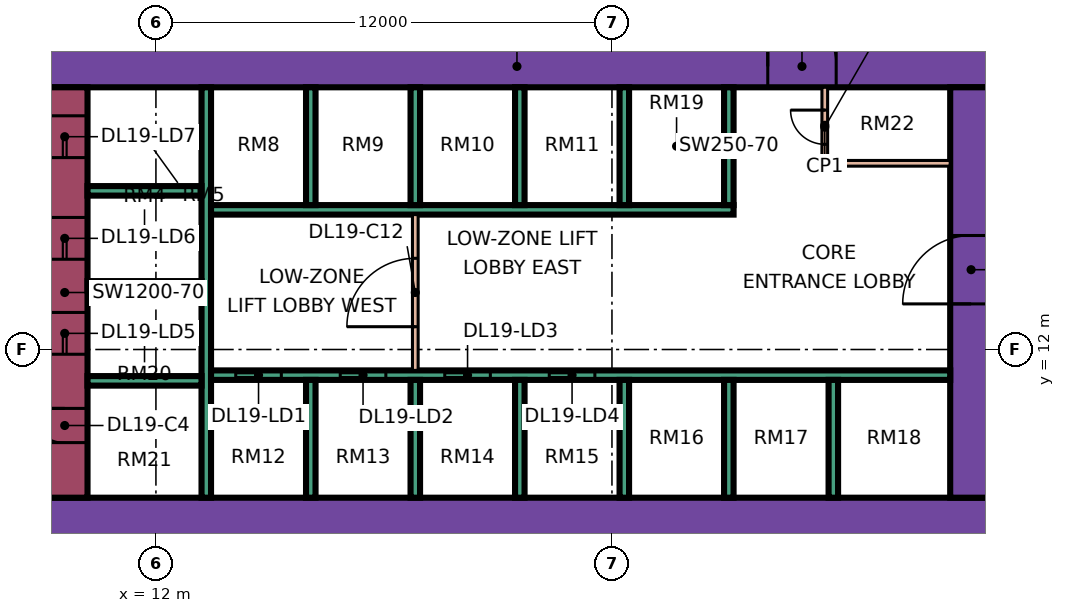
"""IFC4 building model, lengths in metres.
Left out: names, types, materials, properties, quantities, classifications, styles, units other than length and angle.
Written with IfcOpenShell. Run it as: python <this file> out.ifc"""

import sys

from ifc_helpers import new_model, si_unit, direction, frame, frame_2d, origin, place, context, subcontext, project, spatial, rectangle, extrude, element, fill, save


model = new_model("IFC4")
c1 = context("Model", 3, precision=1e-05, world=origin(), true_north=direction((0.0, 1.0)))
c2 = subcontext(c1, "Body", "Model", "MODEL_VIEW")
j1 = project(units=[si_unit("LENGTHUNIT", "METRE"), si_unit("PLANEANGLEUNIT", "RADIAN")], contexts=[c1])
p1 = place(None, origin())
s1 = spatial("IfcSite", under=j1, at=p1, CompositionType="ELEMENT")
p2 = place(p1, origin())
s2 = spatial("IfcBuilding", under=s1, at=p2, CompositionType="ELEMENT")
p3 = place(p2, frame((0.0, 0.0, 86.4)))
s3 = spatial("IfcBuildingStorey", under=s2, at=p3, CompositionType="ELEMENT", Elevation=86.4)
p4 = place(p3, frame((9.0, 7.55, 0.0), z_axis=(0.0, 0.0, 1.0), x_axis=(1.0, 0.0, 0.0)))
e1 = element("IfcWall", 1, at=p4, inside=s3, PredefinedType="SHEAR", context=c2, shape_type="SweptSolid", body=[
    extrude(rectangle(XDim=25.0, YDim=1.1, at=frame_2d((12.5, 0.0))), origin(), (0.0, 0.0, 1.0), 5.5),
])
p5 = place(p3, frame((9.0, 19.45, 0.0), z_axis=(0.0, 0.0, 1.0), x_axis=(1.0, 0.0, 0.0)))
e2 = element("IfcWall", 2, at=p5, inside=s3, PredefinedType="SHEAR", context=c2, shape_type="SweptSolid", body=[
    extrude(rectangle(XDim=25.0, YDim=1.1, at=frame_2d((12.5, 0.0))), origin(), (0.0, 0.0, 1.0), 5.5),
])
p6 = place(p5, frame((19.1, 0.0, 0.0)))
e3 = element("IfcOpeningElement", 3, at=p6, cuts=e2, PredefinedType="OPENING", context=c2, shape_type="SweptSolid", body=[
    extrude(rectangle(XDim=1.8, YDim=2.4, at=frame_2d((0.9, 1.2))), frame((0.0, 0.56, 0.0), z_axis=(0.0, -1.0, 0.0), x_axis=(1.0, 0.0, 0.0)), (0.0, 0.0, 1.0), 1.12),
])
p7 = place(p3, frame((9.6, 8.1, 0.0), z_axis=(0.0, 0.0, 1.0), x_axis=(0.0, 1.0, 0.0)))
e4 = element("IfcWall", 4, at=p7, inside=s3, PredefinedType="SHEAR", context=c2, shape_type="SweptSolid", body=[
    extrude(rectangle(XDim=10.8, YDim=1.2, at=frame_2d((5.4, 0.0))), origin(), (0.0, 0.0, 1.0), 5.5),
])
p8 = place(p7, frame((3.775, 0.0, 0.0)))
e5 = element("IfcOpeningElement", 5, at=p8, cuts=e4, PredefinedType="OPENING", context=c2, shape_type="SweptSolid", body=[
    extrude(rectangle(XDim=1.1, YDim=2.2, at=frame_2d((0.55, 1.1))), frame((0.0, 0.61, 0.0), z_axis=(0.0, -1.0, 0.0), x_axis=(1.0, 0.0, 0.0)), (0.0, 0.0, 1.0), 1.22),
])
p9 = place(p7, frame((6.275, 0.0, 0.0)))
e6 = element("IfcOpeningElement", 6, at=p9, cuts=e4, PredefinedType="OPENING", context=c2, shape_type="SweptSolid", body=[
    extrude(rectangle(XDim=1.1, YDim=2.2, at=frame_2d((0.55, 1.1))), frame((0.0, 0.61, 0.0), z_axis=(0.0, -1.0, 0.0), x_axis=(1.0, 0.0, 0.0)), (0.0, 0.0, 1.0), 1.22),
])
p10 = place(p7, frame((8.95, 0.0, 0.0)))
e7 = element("IfcOpeningElement", 7, at=p10, cuts=e4, PredefinedType="OPENING", context=c2, shape_type="SweptSolid", body=[
    extrude(rectangle(XDim=1.1, YDim=2.2, at=frame_2d((0.55, 1.1))), frame((0.0, 0.61, 0.0), z_axis=(0.0, -1.0, 0.0), x_axis=(1.0, 0.0, 0.0)), (0.0, 0.0, 1.0), 1.22),
])
p11 = place(p7, frame((1.45, 0.0, 0.0)))
e8 = element("IfcOpeningElement", 8, at=p11, cuts=e4, PredefinedType="OPENING", context=c2, shape_type="SweptSolid", body=[
    extrude(rectangle(XDim=0.9, YDim=2.1, at=frame_2d((0.45, 1.05))), frame((0.0, 0.61, 0.0), z_axis=(0.0, -1.0, 0.0), x_axis=(1.0, 0.0, 0.0)), (0.0, 0.0, 1.0), 1.22),
])
p12 = place(p3, frame((33.45, 8.1, 0.0), z_axis=(0.0, 0.0, 1.0), x_axis=(0.0, 1.0, 0.0)))
e9 = element("IfcWall", 9, at=p12, inside=s3, PredefinedType="SHEAR", context=c2, shape_type="SweptSolid", body=[
    extrude(rectangle(XDim=10.8, YDim=1.1, at=frame_2d((5.4, 0.0))), origin(), (0.0, 0.0, 1.0), 5.5),
])
p13 = place(p12, frame((5.1, 0.0, 0.0)))
e10 = element("IfcOpeningElement", 10, at=p13, cuts=e9, PredefinedType="OPENING", context=c2, shape_type="SweptSolid", body=[
    extrude(rectangle(XDim=1.8, YDim=2.4, at=frame_2d((0.9, 1.2))), frame((0.0, 0.56, 0.0), z_axis=(0.0, -1.0, 0.0), x_axis=(1.0, 0.0, 0.0)), (0.0, 0.0, 1.0), 1.12),
])
p14 = place(p3, frame((13.325, 8.1, 0.0), z_axis=(0.0, 0.0, 1.0), x_axis=(0.0, 1.0, 0.0)))
e11 = element("IfcWall", 11, at=p14, inside=s3, PredefinedType="SHEAR", context=c2, shape_type="SweptSolid", body=[
    extrude(rectangle(XDim=10.8, YDim=0.25, at=frame_2d((5.4, 0.0))), origin(), (0.0, 0.0, 1.0), 5.5),
])
p15 = place(p3, frame((13.45, 11.325, 0.0), z_axis=(0.0, 0.0, 1.0), x_axis=(1.0, 0.0, 0.0)))
e12 = element("IfcWall", 12, at=p15, inside=s3, PredefinedType="SHEAR", context=c2, shape_type="SweptSolid", body=[
    extrude(rectangle(XDim=19.45, YDim=0.25, at=frame_2d((9.725, 0.0))), origin(), (0.0, 0.0, 1.0), 5.5),
])
p16 = place(p15, frame((0.65, 0.0, 0.0)))
e13 = element("IfcOpeningElement", 13, at=p16, cuts=e12, PredefinedType="OPENING", context=c2, shape_type="SweptSolid", body=[
    extrude(rectangle(XDim=1.2, YDim=2.2, at=frame_2d((0.6, 1.1))), frame((0.0, 0.135, 0.0), z_axis=(0.0, -1.0, 0.0), x_axis=(1.0, 0.0, 0.0)), (0.0, 0.0, 1.0), 0.27),
])
p17 = place(p15, frame((3.4, 0.0, 0.0)))
e14 = element("IfcOpeningElement", 14, at=p17, cuts=e12, PredefinedType="OPENING", context=c2, shape_type="SweptSolid", body=[
    extrude(rectangle(XDim=1.2, YDim=2.2, at=frame_2d((0.6, 1.1))), frame((0.0, 0.135, 0.0), z_axis=(0.0, -1.0, 0.0), x_axis=(1.0, 0.0, 0.0)), (0.0, 0.0, 1.0), 0.27),
])
p18 = place(p15, frame((6.15, 0.0, 0.0)))
e15 = element("IfcOpeningElement", 15, at=p18, cuts=e12, PredefinedType="OPENING", context=c2, shape_type="SweptSolid", body=[
    extrude(rectangle(XDim=1.2, YDim=2.2, at=frame_2d((0.6, 1.1))), frame((0.0, 0.135, 0.0), z_axis=(0.0, -1.0, 0.0), x_axis=(1.0, 0.0, 0.0)), (0.0, 0.0, 1.0), 0.27),
])
p19 = place(p15, frame((8.9, 0.0, 0.0)))
e16 = element("IfcOpeningElement", 16, at=p19, cuts=e12, PredefinedType="OPENING", context=c2, shape_type="SweptSolid", body=[
    extrude(rectangle(XDim=1.2, YDim=2.2, at=frame_2d((0.6, 1.1))), frame((0.0, 0.135, 0.0), z_axis=(0.0, -1.0, 0.0), x_axis=(1.0, 0.0, 0.0)), (0.0, 0.0, 1.0), 0.27),
])
p20 = place(p3, frame((13.45, 15.675, 0.0), z_axis=(0.0, 0.0, 1.0), x_axis=(1.0, 0.0, 0.0)))
e17 = element("IfcWall", 17, at=p20, inside=s3, PredefinedType="SHEAR", context=c2, shape_type="SweptSolid", body=[
    extrude(rectangle(XDim=13.75, YDim=0.25, at=frame_2d((6.875, 0.0))), origin(), (0.0, 0.0, 1.0), 5.5),
])
for number, where, z_axis, x_axis in (
    (18, (10.2, 11.175, 0.0), (0.0, 0.0, 1.0), (1.0, 0.0, 0.0)),
    (19, (10.2, 13.675, 0.0), (0.0, 0.0, 1.0), (1.0, 0.0, 0.0)),
    (20, (10.2, 16.175, 0.0), (0.0, 0.0, 1.0), (1.0, 0.0, 0.0)),
):
    element("IfcWall", number, at=place(p3, frame(where, z_axis=z_axis, x_axis=x_axis)), inside=s3, PredefinedType="SHEAR", context=c2, shape_type="SweptSolid", body=[
        extrude(rectangle(XDim=3.0, YDim=0.25, at=frame_2d((1.5, 0.0))), origin(), (0.0, 0.0, 1.0), 5.5),
    ])
for number, where, z_axis, x_axis in (
    (21, (16.075, 8.1, 0.0), (0.0, 0.0, 1.0), (0.0, 1.0, 0.0)),
    (22, (18.825, 8.1, 0.0), (0.0, 0.0, 1.0), (0.0, 1.0, 0.0)),
    (23, (21.575, 8.1, 0.0), (0.0, 0.0, 1.0), (0.0, 1.0, 0.0)),
    (24, (24.325, 8.1, 0.0), (0.0, 0.0, 1.0), (0.0, 1.0, 0.0)),
    (25, (27.075, 8.1, 0.0), (0.0, 0.0, 1.0), (0.0, 1.0, 0.0)),
    (26, (29.825, 8.1, 0.0), (0.0, 0.0, 1.0), (0.0, 1.0, 0.0)),
    (27, (16.075, 15.8, 0.0), (0.0, 0.0, 1.0), (0.0, 1.0, 0.0)),
    (28, (18.825, 15.8, 0.0), (0.0, 0.0, 1.0), (0.0, 1.0, 0.0)),
    (29, (21.575, 15.8, 0.0), (0.0, 0.0, 1.0), (0.0, 1.0, 0.0)),
    (30, (24.325, 15.8, 0.0), (0.0, 0.0, 1.0), (0.0, 1.0, 0.0)),
    (31, (27.075, 15.8, 0.0), (0.0, 0.0, 1.0), (0.0, 1.0, 0.0)),
):
    element("IfcWall", number, at=place(p3, frame(where, z_axis=z_axis, x_axis=x_axis)), inside=s3, PredefinedType="SHEAR", context=c2, shape_type="SweptSolid", body=[
        extrude(rectangle(XDim=3.1, YDim=0.25, at=frame_2d((1.55, 0.0))), origin(), (0.0, 0.0, 1.0), 5.5),
    ])
p21 = place(p3, frame((-1.447, 12.553, 0.0), z_axis=(0.0, 0.0, 1.0), x_axis=(0.707106781187, -0.707106781187, 0.0)))
e32 = element("IfcWall", 32, at=p21, inside=s3, PredefinedType="SOLIDWALL", context=c2, shape_type="SweptSolid", body=[
    extrude(rectangle(XDim=19.799, YDim=0.15, at=frame_2d((9.899, 0.0))), origin(), (0.0, 0.0, 1.0), 5.1),
])
p22 = place(p21, frame((11.453, 0.0, 0.45)))
e33 = element("IfcOpeningElement", 33, at=p22, cuts=e32, PredefinedType="OPENING", context=c2, shape_type="SweptSolid", body=[
    extrude(rectangle(XDim=3.0, YDim=3.6, at=frame_2d((1.5, 1.8))), frame((0.0, 0.085, 0.0), z_axis=(0.0, -1.0, 0.0), x_axis=(1.0, 0.0, 0.0)), (0.0, 0.0, 1.0), 0.17),
])
p23 = place(p3, frame((18.825, 11.45, 0.0), z_axis=(0.0, 0.0, 1.0), x_axis=(0.0, 1.0, 0.0)))
e34 = element("IfcWall", 34, at=p23, inside=s3, PredefinedType="PARTITIONING", context=c2, shape_type="SweptSolid", body=[
    extrude(rectangle(XDim=4.1, YDim=0.15, at=frame_2d((2.05, 0.0))), origin(), (0.0, 0.0, 1.0), 5.1),
])
p24 = place(p23, frame((1.15, 0.0, 0.0)))
e35 = element("IfcOpeningElement", 35, at=p24, cuts=e34, PredefinedType="OPENING", context=c2, shape_type="SweptSolid", body=[
    extrude(rectangle(XDim=1.8, YDim=2.4, at=frame_2d((0.9, 1.2))), frame((0.0, 0.085, 0.0), z_axis=(0.0, -1.0, 0.0), x_axis=(1.0, 0.0, 0.0)), (0.0, 0.0, 1.0), 0.17),
])
p25 = place(p3, frame((29.6, 16.9, 0.0), z_axis=(0.0, 0.0, 1.0), x_axis=(0.0, 1.0, 0.0)))
e36 = element("IfcWall", 36, at=p25, inside=s3, PredefinedType="PARTITIONING", context=c2, shape_type="SweptSolid", body=[
    extrude(rectangle(XDim=2.0, YDim=0.15, at=frame_2d((1.0, 0.0))), origin(), (0.0, 0.0, 1.0), 5.1),
])
p26 = place(p25, frame((0.5, 0.0, 0.0)))
e37 = element("IfcOpeningElement", 37, at=p26, cuts=e36, PredefinedType="OPENING", context=c2, shape_type="SweptSolid", body=[
    extrude(rectangle(XDim=0.9, YDim=2.1, at=frame_2d((0.45, 1.05))), frame((0.0, 0.085, 0.0), z_axis=(0.0, -1.0, 0.0), x_axis=(1.0, 0.0, 0.0)), (0.0, 0.0, 1.0), 0.17),
])
p27 = place(p3, frame((29.6, 16.9, 0.0), z_axis=(0.0, 0.0, 1.0), x_axis=(1.0, 0.0, 0.0)))
e38 = element("IfcWall", 38, at=p27, inside=s3, PredefinedType="PARTITIONING", context=c2, shape_type="SweptSolid", body=[
    extrude(rectangle(XDim=3.3, YDim=0.15, at=frame_2d((1.65, 0.0))), origin(), (0.0, 0.0, 1.0), 5.1),
])
p28 = place(p16, origin())
e39 = element("IfcDoor", 39, at=p28, inside=s3, OperationType="DOUBLE_DOOR_SLIDING", PredefinedType="DOOR", context=c2, shape_type="SweptSolid", body=[
    extrude(rectangle(XDim=1.2, YDim=2.2, at=frame_2d((0.6, 1.1))), frame((0.0, 0.025, 0.0), z_axis=(0.0, -1.0, 0.0), x_axis=(1.0, 0.0, 0.0)), (0.0, 0.0, 1.0), 0.05),
])
fill(e13, e39)
p29 = place(p17, origin())
e40 = element("IfcDoor", 40, at=p29, inside=s3, OperationType="DOUBLE_DOOR_SLIDING", PredefinedType="DOOR", context=c2, shape_type="SweptSolid", body=[
    extrude(rectangle(XDim=1.2, YDim=2.2, at=frame_2d((0.6, 1.1))), frame((0.0, 0.025, 0.0), z_axis=(0.0, -1.0, 0.0), x_axis=(1.0, 0.0, 0.0)), (0.0, 0.0, 1.0), 0.05),
])
fill(e14, e40)
p30 = place(p18, origin())
e41 = element("IfcDoor", 41, at=p30, inside=s3, OperationType="DOUBLE_DOOR_SLIDING", PredefinedType="DOOR", context=c2, shape_type="SweptSolid", body=[
    extrude(rectangle(XDim=1.2, YDim=2.2, at=frame_2d((0.6, 1.1))), frame((0.0, 0.025, 0.0), z_axis=(0.0, -1.0, 0.0), x_axis=(1.0, 0.0, 0.0)), (0.0, 0.0, 1.0), 0.05),
])
fill(e15, e41)
p31 = place(p19, origin())
e42 = element("IfcDoor", 42, at=p31, inside=s3, OperationType="DOUBLE_DOOR_SLIDING", PredefinedType="DOOR", context=c2, shape_type="SweptSolid", body=[
    extrude(rectangle(XDim=1.2, YDim=2.2, at=frame_2d((0.6, 1.1))), frame((0.0, 0.025, 0.0), z_axis=(0.0, -1.0, 0.0), x_axis=(1.0, 0.0, 0.0)), (0.0, 0.0, 1.0), 0.05),
])
fill(e16, e42)
p32 = place(p8, origin())
e43 = element("IfcDoor", 43, at=p32, inside=s3, OperationType="DOUBLE_DOOR_SLIDING", PredefinedType="DOOR", context=c2, shape_type="SweptSolid", body=[
    extrude(rectangle(XDim=1.1, YDim=2.2, at=frame_2d((0.55, 1.1))), frame((0.0, 0.025, 0.0), z_axis=(0.0, -1.0, 0.0), x_axis=(1.0, 0.0, 0.0)), (0.0, 0.0, 1.0), 0.05),
])
fill(e5, e43)
p33 = place(p9, origin())
e44 = element("IfcDoor", 44, at=p33, inside=s3, OperationType="DOUBLE_DOOR_SLIDING", PredefinedType="DOOR", context=c2, shape_type="SweptSolid", body=[
    extrude(rectangle(XDim=1.1, YDim=2.2, at=frame_2d((0.55, 1.1))), frame((0.0, 0.025, 0.0), z_axis=(0.0, -1.0, 0.0), x_axis=(1.0, 0.0, 0.0)), (0.0, 0.0, 1.0), 0.05),
])
fill(e6, e44)
p34 = place(p10, origin())
e45 = element("IfcDoor", 45, at=p34, inside=s3, OperationType="DOUBLE_DOOR_SLIDING", PredefinedType="DOOR", context=c2, shape_type="SweptSolid", body=[
    extrude(rectangle(XDim=1.1, YDim=2.2, at=frame_2d((0.55, 1.1))), frame((0.0, 0.025, 0.0), z_axis=(0.0, -1.0, 0.0), x_axis=(1.0, 0.0, 0.0)), (0.0, 0.0, 1.0), 0.05),
])
fill(e7, e45)
p35 = place(p13, origin())
e46 = element("IfcDoor", 46, at=p35, inside=s3, OperationType="DOUBLE_DOOR_SINGLE_SWING", PredefinedType="DOOR", context=c2, shape_type="SweptSolid", body=[
    extrude(rectangle(XDim=1.8, YDim=2.4, at=frame_2d((0.9, 1.2))), frame((0.0, 0.025, 0.0), z_axis=(0.0, -1.0, 0.0), x_axis=(1.0, 0.0, 0.0)), (0.0, 0.0, 1.0), 0.05),
])
fill(e10, e46)
p36 = place(p6, origin())
e47 = element("IfcDoor", 47, at=p36, inside=s3, OperationType="DOUBLE_DOOR_SINGLE_SWING", PredefinedType="DOOR", context=c2, shape_type="SweptSolid", body=[
    extrude(rectangle(XDim=1.8, YDim=2.4, at=frame_2d((0.9, 1.2))), frame((0.0, 0.025, 0.0), z_axis=(0.0, -1.0, 0.0), x_axis=(1.0, 0.0, 0.0)), (0.0, 0.0, 1.0), 0.05),
])
fill(e3, e47)
p37 = place(p11, frame((0.9, 0.0, 0.0), z_axis=(0.0, 0.0, 1.0), x_axis=(-1.0, 0.0, 0.0)))
e48 = element("IfcDoor", 48, at=p37, inside=s3, OperationType="SINGLE_SWING_RIGHT", PredefinedType="DOOR", context=c2, shape_type="SweptSolid", body=[
    extrude(rectangle(XDim=0.9, YDim=2.1, at=frame_2d((0.45, 1.05))), frame((0.0, 0.025, 0.0), z_axis=(0.0, -1.0, 0.0), x_axis=(1.0, 0.0, 0.0)), (0.0, 0.0, 1.0), 0.05),
])
fill(e8, e48)
p38 = place(p24, origin())
e49 = element("IfcDoor", 49, at=p38, inside=s3, OperationType="DOUBLE_DOOR_SINGLE_SWING", PredefinedType="DOOR", context=c2, shape_type="SweptSolid", body=[
    extrude(rectangle(XDim=1.8, YDim=2.4, at=frame_2d((0.9, 1.2))), frame((0.0, 0.025, 0.0), z_axis=(0.0, -1.0, 0.0), x_axis=(1.0, 0.0, 0.0)), (0.0, 0.0, 1.0), 0.05),
])
fill(e35, e49)
p39 = place(p26, frame((0.9, 0.0, 0.0), z_axis=(0.0, 0.0, 1.0), x_axis=(-1.0, 0.0, 0.0)))
e50 = element("IfcDoor", 50, at=p39, inside=s3, OperationType="SINGLE_SWING_RIGHT", PredefinedType="DOOR", context=c2, shape_type="SweptSolid", body=[
    extrude(rectangle(XDim=0.9, YDim=2.1, at=frame_2d((0.45, 1.05))), frame((0.0, 0.025, 0.0), z_axis=(0.0, -1.0, 0.0), x_axis=(1.0, 0.0, 0.0)), (0.0, 0.0, 1.0), 0.05),
])
fill(e37, e50)
save(model, sys.argv[1])
